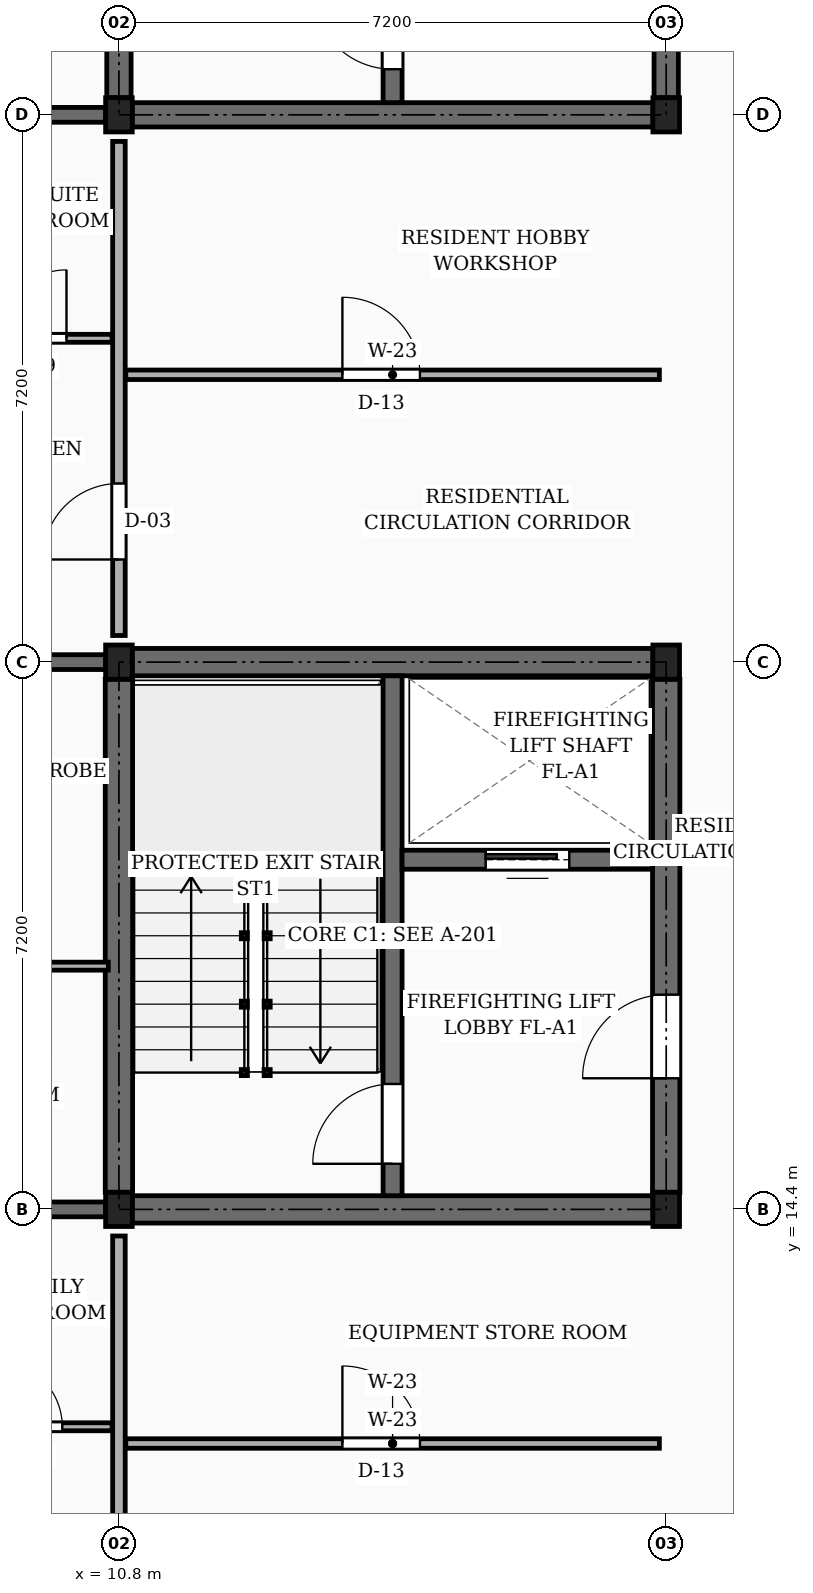
"""IFC4 building model, lengths in metres.
Left out: names, types, materials, properties, quantities, classifications, styles, units other than length and angle.
Written with IfcOpenShell. Run it as: python <this file> out.ifc"""

import sys

from ifc_helpers import new_model, si_unit, direction, frame, frame_2d, origin, origin_2d, place, context, subcontext, project, spatial, rectangle, extrude, element, fill, save


model = new_model("IFC4")
c1 = context("Model", 3, precision=1e-05, world=origin(), true_north=direction((0.0, 1.0)))
c2 = subcontext(c1, "Body", "Model", "MODEL_VIEW")
j1 = project(units=[si_unit("LENGTHUNIT", "METRE"), si_unit("PLANEANGLEUNIT", "RADIAN")], contexts=[c1])
p1 = place(None, origin())
s1 = spatial("IfcSite", under=j1, at=p1, CompositionType="ELEMENT")
p2 = place(p1, origin())
s2 = spatial("IfcBuilding", under=s1, at=p2, CompositionType="ELEMENT")
p3 = place(p2, frame((0.0, 0.0, 45.45)))
s3 = spatial("IfcBuildingStorey", under=s2, at=p3, CompositionType="ELEMENT", Elevation=45.45)
for number, where, z_axis, x_axis in (
    (1, (10.8, 14.4, 0.0), (0.0, 0.0, 1.0), (1.0, 0.0, 0.0)),
    (2, (10.8, 21.6, 0.0), (0.0, 0.0, 1.0), (1.0, 0.0, 0.0)),
    (3, (10.8, 28.8, 0.0), (0.0, 0.0, 1.0), (1.0, 0.0, 0.0)),
    (4, (18.0, 14.4, 0.0), (0.0, 0.0, 1.0), (1.0, 0.0, 0.0)),
    (5, (18.0, 21.6, 0.0), (0.0, 0.0, 1.0), (1.0, 0.0, 0.0)),
    (6, (18.0, 28.8, 0.0), (0.0, 0.0, 1.0), (1.0, 0.0, 0.0)),
):
    element("IfcColumn", number, at=place(p3, frame(where, z_axis=z_axis, x_axis=x_axis)), inside=s3, PredefinedType="COLUMN", context=c2, shape_type="SweptSolid", body=[
        extrude(rectangle(XDim=0.35, YDim=0.45, at=origin_2d()), origin(), (0.0, 0.0, 1.0), 3.15),
    ])
p4 = place(p3, frame((3.775, 14.4, 0.0), z_axis=(0.0, 0.0, 1.0), x_axis=(1.0, 0.0, 0.0)))
e7 = element("IfcWall", 7, at=p4, inside=s3, PredefinedType="SOLIDWALL", context=c2, shape_type="SweptSolid", body=[
    extrude(rectangle(XDim=6.85, YDim=0.195, at=frame_2d((3.425, 0.0))), origin(), (0.0, 0.0, 1.0), 2.17),
])
p5 = place(p4, frame((1.35, 0.0, 0.0)))
e8 = element("IfcOpeningElement", 8, at=p5, cuts=e7, PredefinedType="OPENING", context=c2, shape_type="SweptSolid", body=[
    extrude(rectangle(XDim=0.98, YDim=2.12, at=frame_2d((0.49, 1.06))), frame((0.0, 0.107, 0.0), z_axis=(0.0, -1.0, 0.0), x_axis=(1.0, 0.0, 0.0)), (0.0, 0.0, 1.0), 0.215),
])
p6 = place(p3, frame((3.775, 21.6, 0.0), z_axis=(0.0, 0.0, 1.0), x_axis=(1.0, 0.0, 0.0)))
e9 = element("IfcWall", 9, at=p6, inside=s3, PredefinedType="SOLIDWALL", context=c2, shape_type="SweptSolid", body=[
    extrude(rectangle(XDim=6.85, YDim=0.195, at=frame_2d((3.425, 0.0))), origin(), (0.0, 0.0, 1.0), 2.17),
])
p7 = place(p3, frame((3.775, 28.8, 0.0), z_axis=(0.0, 0.0, 1.0), x_axis=(1.0, 0.0, 0.0)))
e10 = element("IfcWall", 10, at=p7, inside=s3, PredefinedType="SOLIDWALL", context=c2, shape_type="SweptSolid", body=[
    extrude(rectangle(XDim=6.85, YDim=0.195, at=frame_2d((3.425, 0.0))), origin(), (0.0, 0.0, 1.0), 2.17),
])
p8 = place(p7, frame((1.35, 0.0, 0.0)))
e11 = element("IfcOpeningElement", 11, at=p8, cuts=e10, PredefinedType="OPENING", context=c2, shape_type="SweptSolid", body=[
    extrude(rectangle(XDim=0.98, YDim=2.12, at=frame_2d((0.49, 1.06))), frame((0.0, 0.107, 0.0), z_axis=(0.0, -1.0, 0.0), x_axis=(1.0, 0.0, 0.0)), (0.0, 0.0, 1.0), 0.215),
])
p9 = place(p3, frame((10.8, 14.625, 0.0), z_axis=(0.0, 0.0, 1.0), x_axis=(0.0, 1.0, 0.0)))
e12 = element("IfcWall", 12, at=p9, inside=s3, PredefinedType="SHEAR", context=c2, shape_type="SweptSolid", body=[
    extrude(rectangle(XDim=6.75, YDim=0.36, at=frame_2d((3.375, 0.0))), origin(), (0.0, 0.0, 1.0), 2.87),
])
p10 = place(p3, frame((10.975, 21.6, 0.0), z_axis=(0.0, 0.0, 1.0), x_axis=(1.0, 0.0, 0.0)))
e13 = element("IfcWall", 13, at=p10, inside=s3, PredefinedType="SHEAR", context=c2, shape_type="SweptSolid", body=[
    extrude(rectangle(XDim=6.85, YDim=0.36, at=frame_2d((3.425, 0.0))), origin(), (0.0, 0.0, 1.0), 2.87),
])
p11 = place(p3, frame((18.0, 14.625, 0.0), z_axis=(0.0, 0.0, 1.0), x_axis=(0.0, 1.0, 0.0)))
e14 = element("IfcWall", 14, at=p11, inside=s3, PredefinedType="SHEAR", context=c2, shape_type="SweptSolid", body=[
    extrude(rectangle(XDim=6.75, YDim=0.36, at=frame_2d((3.375, 0.0))), origin(), (0.0, 0.0, 1.0), 2.87),
])
p12 = place(p11, frame((1.5, 0.0, 0.0)))
e15 = element("IfcOpeningElement", 15, at=p12, cuts=e14, PredefinedType="OPENING", context=c2, shape_type="SweptSolid", body=[
    extrude(rectangle(XDim=1.1, YDim=2.15, at=frame_2d((0.55, 1.075))), frame((0.0, 0.19, 0.0), z_axis=(0.0, -1.0, 0.0), x_axis=(1.0, 0.0, 0.0)), (0.0, 0.0, 1.0), 0.38),
])
p13 = place(p3, frame((10.975, 14.4, 0.0), z_axis=(0.0, 0.0, 1.0), x_axis=(1.0, 0.0, 0.0)))
e16 = element("IfcWall", 16, at=p13, inside=s3, PredefinedType="SHEAR", context=c2, shape_type="SweptSolid", body=[
    extrude(rectangle(XDim=6.85, YDim=0.36, at=frame_2d((3.425, 0.0))), origin(), (0.0, 0.0, 1.0), 2.87),
])
p14 = place(p3, frame((14.4, 14.58, 0.0), z_axis=(0.0, 0.0, 1.0), x_axis=(0.0, 1.0, 0.0)))
e17 = element("IfcWall", 17, at=p14, inside=s3, PredefinedType="SHEAR", context=c2, shape_type="SweptSolid", body=[
    extrude(rectangle(XDim=6.84, YDim=0.25, at=frame_2d((3.42, 0.0))), origin(), (0.0, 0.0, 1.0), 2.87),
])
p15 = place(p14, frame((0.42, 0.0, 0.0)))
e18 = element("IfcOpeningElement", 18, at=p15, cuts=e17, PredefinedType="OPENING", context=c2, shape_type="SweptSolid", body=[
    extrude(rectangle(XDim=1.05, YDim=2.15, at=frame_2d((0.525, 1.075))), frame((0.0, 0.135, 0.0), z_axis=(0.0, -1.0, 0.0), x_axis=(1.0, 0.0, 0.0)), (0.0, 0.0, 1.0), 0.27),
])
p16 = place(p3, frame((14.525, 19.0, 0.0), z_axis=(0.0, 0.0, 1.0), x_axis=(1.0, 0.0, 0.0)))
e19 = element("IfcWall", 19, at=p16, inside=s3, PredefinedType="SHEAR", context=c2, shape_type="SweptSolid", body=[
    extrude(rectangle(XDim=3.295, YDim=0.25, at=frame_2d((1.647, 0.0))), origin(), (0.0, 0.0, 1.0), 2.87),
])
p17 = place(p16, frame((1.1, 0.0, 0.0)))
e20 = element("IfcOpeningElement", 20, at=p17, cuts=e19, PredefinedType="OPENING", context=c2, shape_type="SweptSolid", body=[
    extrude(rectangle(XDim=1.1, YDim=2.2, at=frame_2d((0.55, 1.1))), frame((0.0, 0.135, 0.0), z_axis=(0.0, -1.0, 0.0), x_axis=(1.0, 0.0, 0.0)), (0.0, 0.0, 1.0), 0.27),
])
p18 = place(p3, frame((10.8, 29.025, 0.0), z_axis=(0.0, 0.0, 1.0), x_axis=(0.0, 1.0, 0.0)))
e21 = element("IfcWall", 21, at=p18, inside=s3, PredefinedType="SHEAR", context=c2, shape_type="SweptSolid", body=[
    extrude(rectangle(XDim=6.75, YDim=0.32, at=frame_2d((3.375, 0.0))), origin(), (0.0, 0.0, 1.0), 2.87),
])
p19 = place(p3, frame((18.0, 29.025, 0.0), z_axis=(0.0, 0.0, 1.0), x_axis=(0.0, 1.0, 0.0)))
e22 = element("IfcWall", 22, at=p19, inside=s3, PredefinedType="SHEAR", context=c2, shape_type="SweptSolid", body=[
    extrude(rectangle(XDim=6.75, YDim=0.32, at=frame_2d((3.375, 0.0))), origin(), (0.0, 0.0, 1.0), 2.87),
])
p20 = place(p19, frame((1.5, 0.0, 0.0)))
e23 = element("IfcOpeningElement", 23, at=p20, cuts=e22, PredefinedType="OPENING", context=c2, shape_type="SweptSolid", body=[
    extrude(rectangle(XDim=1.1, YDim=2.15, at=frame_2d((0.55, 1.075))), frame((0.0, 0.17, 0.0), z_axis=(0.0, -1.0, 0.0), x_axis=(1.0, 0.0, 0.0)), (0.0, 0.0, 1.0), 0.34),
])
p21 = place(p3, frame((10.975, 28.8, 0.0), z_axis=(0.0, 0.0, 1.0), x_axis=(1.0, 0.0, 0.0)))
e24 = element("IfcWall", 24, at=p21, inside=s3, PredefinedType="SHEAR", context=c2, shape_type="SweptSolid", body=[
    extrude(rectangle(XDim=6.85, YDim=0.32, at=frame_2d((3.425, 0.0))), origin(), (0.0, 0.0, 1.0), 2.87),
])
p22 = place(p3, frame((14.4, 28.96, 0.0), z_axis=(0.0, 0.0, 1.0), x_axis=(0.0, 1.0, 0.0)))
e25 = element("IfcWall", 25, at=p22, inside=s3, PredefinedType="SHEAR", context=c2, shape_type="SweptSolid", body=[
    extrude(rectangle(XDim=6.88, YDim=0.25, at=frame_2d((3.44, 0.0))), origin(), (0.0, 0.0, 1.0), 2.87),
])
p23 = place(p22, frame((0.44, 0.0, 0.0)))
e26 = element("IfcOpeningElement", 26, at=p23, cuts=e25, PredefinedType="OPENING", context=c2, shape_type="SweptSolid", body=[
    extrude(rectangle(XDim=1.05, YDim=2.15, at=frame_2d((0.525, 1.075))), frame((0.0, 0.135, 0.0), z_axis=(0.0, -1.0, 0.0), x_axis=(1.0, 0.0, 0.0)), (0.0, 0.0, 1.0), 0.27),
])
p24 = place(p3, frame((10.8, 7.55, 0.0), z_axis=(0.0, 0.0, 1.0), x_axis=(0.0, 1.0, 0.0)))
e27 = element("IfcWall", 27, at=p24, inside=s3, PredefinedType="PARTITIONING", context=c2, shape_type="SweptSolid", body=[
    extrude(rectangle(XDim=6.5, YDim=0.165, at=frame_2d((3.25, 0.0))), origin(), (0.0, 0.0, 1.0), 2.305),
])
p25 = place(p24, frame((1.0, 0.0, 0.0)))
e28 = element("IfcOpeningElement", 28, at=p25, cuts=e27, PredefinedType="OPENING", context=c2, shape_type="SweptSolid", body=[
    extrude(rectangle(XDim=1.14, YDim=2.18, at=frame_2d((0.57, 1.09))), frame((0.0, 0.093, 0.0), z_axis=(0.0, -1.0, 0.0), x_axis=(1.0, 0.0, 0.0)), (0.0, 0.0, 1.0), 0.185),
])
p26 = place(p3, frame((10.8, 21.95, 0.0), z_axis=(0.0, 0.0, 1.0), x_axis=(0.0, 1.0, 0.0)))
e29 = element("IfcWall", 29, at=p26, inside=s3, PredefinedType="PARTITIONING", context=c2, shape_type="SweptSolid", body=[
    extrude(rectangle(XDim=6.5, YDim=0.165, at=frame_2d((3.25, 0.0))), origin(), (0.0, 0.0, 1.0), 2.305),
])
p27 = place(p26, frame((1.0, 0.0, 0.0)))
e30 = element("IfcOpeningElement", 30, at=p27, cuts=e29, PredefinedType="OPENING", context=c2, shape_type="SweptSolid", body=[
    extrude(rectangle(XDim=1.0, YDim=2.15, at=frame_2d((0.5, 1.075))), frame((0.0, 0.093, 0.0), z_axis=(0.0, -1.0, 0.0), x_axis=(1.0, 0.0, 0.0)), (0.0, 0.0, 1.0), 0.185),
])
p28 = place(p3, frame((10.89, 11.32, 0.0), z_axis=(0.0, 0.0, 1.0), x_axis=(1.0, 0.0, 0.0)))
e31 = element("IfcWall", 31, at=p28, inside=s3, PredefinedType="PARTITIONING", context=c2, shape_type="SweptSolid", body=[
    extrude(rectangle(XDim=7.02, YDim=0.125, at=frame_2d((3.51, 0.0))), origin(), (0.0, 0.0, 1.0), 2.305),
])
p29 = place(p28, frame((2.85, 0.0, 0.0)))
e32 = element("IfcOpeningElement", 32, at=p29, cuts=e31, PredefinedType="OPENING", context=c2, shape_type="SweptSolid", body=[
    extrude(rectangle(XDim=1.02, YDim=2.15, at=frame_2d((0.51, 1.075))), frame((0.0, 0.073, 0.0), z_axis=(0.0, -1.0, 0.0), x_axis=(1.0, 0.0, 0.0)), (0.0, 0.0, 1.0), 0.145),
])
p30 = place(p3, frame((8.53, 11.54, 0.0), z_axis=(0.0, 0.0, 1.0), x_axis=(1.0, 0.0, 0.0)))
e33 = element("IfcWall", 33, at=p30, inside=s3, PredefinedType="PARTITIONING", context=c2, shape_type="SweptSolid", body=[
    extrude(rectangle(XDim=2.18, YDim=0.105, at=frame_2d((1.09, 0.0))), origin(), (0.0, 0.0, 1.0), 2.305),
])
p31 = place(p30, frame((0.655, 0.0, 0.0)))
e34 = element("IfcOpeningElement", 34, at=p31, cuts=e33, PredefinedType="OPENING", context=c2, shape_type="SweptSolid", body=[
    extrude(rectangle(XDim=0.87, YDim=2.05, at=frame_2d((0.435, 1.025))), frame((0.0, 0.062, 0.0), z_axis=(0.0, -1.0, 0.0), x_axis=(1.0, 0.0, 0.0)), (0.0, 0.0, 1.0), 0.125),
])
p32 = place(p3, frame((7.27, 17.6, 0.0), z_axis=(0.0, 0.0, 1.0), x_axis=(1.0, 0.0, 0.0)))
e35 = element("IfcWall", 35, at=p32, inside=s3, PredefinedType="PARTITIONING", context=c2, shape_type="SweptSolid", body=[
    extrude(rectangle(XDim=3.39, YDim=0.105, at=frame_2d((1.695, 0.0))), origin(), (0.0, 0.0, 1.0), 2.305),
])
p33 = place(p3, frame((10.89, 25.38, 0.0), z_axis=(0.0, 0.0, 1.0), x_axis=(1.0, 0.0, 0.0)))
e36 = element("IfcWall", 36, at=p33, inside=s3, PredefinedType="PARTITIONING", context=c2, shape_type="SweptSolid", body=[
    extrude(rectangle(XDim=7.02, YDim=0.125, at=frame_2d((3.51, 0.0))), origin(), (0.0, 0.0, 1.0), 2.305),
])
p34 = place(p33, frame((2.85, 0.0, 0.0)))
e37 = element("IfcOpeningElement", 37, at=p34, cuts=e36, PredefinedType="OPENING", context=c2, shape_type="SweptSolid", body=[
    extrude(rectangle(XDim=1.02, YDim=2.15, at=frame_2d((0.51, 1.075))), frame((0.0, 0.073, 0.0), z_axis=(0.0, -1.0, 0.0), x_axis=(1.0, 0.0, 0.0)), (0.0, 0.0, 1.0), 0.145),
])
p35 = place(p3, frame((8.61, 25.86, 0.0), z_axis=(0.0, 0.0, 1.0), x_axis=(1.0, 0.0, 0.0)))
e38 = element("IfcWall", 38, at=p35, inside=s3, PredefinedType="PARTITIONING", context=c2, shape_type="SweptSolid", body=[
    extrude(rectangle(XDim=2.1, YDim=0.105, at=frame_2d((1.05, 0.0))), origin(), (0.0, 0.0, 1.0), 2.305),
])
p36 = place(p35, frame((0.6, 0.0, 0.0)))
e39 = element("IfcOpeningElement", 39, at=p36, cuts=e38, PredefinedType="OPENING", context=c2, shape_type="SweptSolid", body=[
    extrude(rectangle(XDim=0.9, YDim=2.05, at=frame_2d((0.45, 1.025))), frame((0.0, 0.062, 0.0), z_axis=(0.0, -1.0, 0.0), x_axis=(1.0, 0.0, 0.0)), (0.0, 0.0, 1.0), 0.125),
])
p37 = place(p12, frame((1.1, 0.0, 0.0), z_axis=(0.0, 0.0, 1.0), x_axis=(-1.0, 0.0, 0.0)))
e40 = element("IfcDoor", 40, at=p37, inside=s3, OperationType="SINGLE_SWING_LEFT", PredefinedType="DOOR", context=c2, shape_type="SweptSolid", body=[
    extrude(rectangle(XDim=1.1, YDim=2.15, at=frame_2d((0.55, 1.075))), frame((0.0, 0.025, 0.0), z_axis=(0.0, -1.0, 0.0), x_axis=(1.0, 0.0, 0.0)), (0.0, 0.0, 1.0), 0.05),
])
fill(e15, e40)
p38 = place(p15, origin())
e41 = element("IfcDoor", 41, at=p38, inside=s3, OperationType="SINGLE_SWING_LEFT", PredefinedType="DOOR", context=c2, shape_type="SweptSolid", body=[
    extrude(rectangle(XDim=1.05, YDim=2.15, at=frame_2d((0.525, 1.075))), frame((0.0, 0.025, 0.0), z_axis=(0.0, -1.0, 0.0), x_axis=(1.0, 0.0, 0.0)), (0.0, 0.0, 1.0), 0.05),
])
fill(e18, e41)
p39 = place(p17, origin())
e42 = element("IfcDoor", 42, at=p39, inside=s3, OperationType="SLIDING_TO_LEFT", PredefinedType="DOOR", context=c2, shape_type="SweptSolid", body=[
    extrude(rectangle(XDim=1.1, YDim=2.2, at=frame_2d((0.55, 1.1))), frame((0.0, 0.025, 0.0), z_axis=(0.0, -1.0, 0.0), x_axis=(1.0, 0.0, 0.0)), (0.0, 0.0, 1.0), 0.05),
])
fill(e20, e42)
p40 = place(p23, origin())
e43 = element("IfcDoor", 43, at=p40, inside=s3, OperationType="SINGLE_SWING_RIGHT", PredefinedType="DOOR", context=c2, shape_type="SweptSolid", body=[
    extrude(rectangle(XDim=1.05, YDim=2.15, at=frame_2d((0.525, 1.075))), frame((0.0, 0.025, 0.0), z_axis=(0.0, -1.0, 0.0), x_axis=(1.0, 0.0, 0.0)), (0.0, 0.0, 1.0), 0.05),
])
fill(e26, e43)
p41 = place(p27, origin())
e44 = element("IfcDoor", 44, at=p41, inside=s3, OperationType="SINGLE_SWING_LEFT", PredefinedType="DOOR", context=c2, shape_type="SweptSolid", body=[
    extrude(rectangle(XDim=1.0, YDim=2.15, at=frame_2d((0.5, 1.075))), frame((0.0, 0.025, 0.0), z_axis=(0.0, -1.0, 0.0), x_axis=(1.0, 0.0, 0.0)), (0.0, 0.0, 1.0), 0.05),
])
fill(e30, e44)
p42 = place(p29, origin())
e45 = element("IfcDoor", 45, at=p42, inside=s3, OperationType="SINGLE_SWING_LEFT", PredefinedType="DOOR", context=c2, shape_type="SweptSolid", body=[
    extrude(rectangle(XDim=1.02, YDim=2.15, at=frame_2d((0.51, 1.075))), frame((0.0, 0.025, 0.0), z_axis=(0.0, -1.0, 0.0), x_axis=(1.0, 0.0, 0.0)), (0.0, 0.0, 1.0), 0.05),
])
fill(e32, e45)
p43 = place(p31, origin())
e46 = element("IfcDoor", 46, at=p43, inside=s3, OperationType="SINGLE_SWING_LEFT", PredefinedType="DOOR", context=c2, shape_type="SweptSolid", body=[
    extrude(rectangle(XDim=0.87, YDim=2.05, at=frame_2d((0.435, 1.025))), frame((0.0, 0.025, 0.0), z_axis=(0.0, -1.0, 0.0), x_axis=(1.0, 0.0, 0.0)), (0.0, 0.0, 1.0), 0.05),
])
fill(e34, e46)
p44 = place(p34, origin())
e47 = element("IfcDoor", 47, at=p44, inside=s3, OperationType="SINGLE_SWING_LEFT", PredefinedType="DOOR", context=c2, shape_type="SweptSolid", body=[
    extrude(rectangle(XDim=1.02, YDim=2.15, at=frame_2d((0.51, 1.075))), frame((0.0, 0.025, 0.0), z_axis=(0.0, -1.0, 0.0), x_axis=(1.0, 0.0, 0.0)), (0.0, 0.0, 1.0), 0.05),
])
fill(e37, e47)
p45 = place(p36, origin())
e48 = element("IfcDoor", 48, at=p45, inside=s3, OperationType="SINGLE_SWING_RIGHT", PredefinedType="DOOR", context=c2, shape_type="SweptSolid", body=[
    extrude(rectangle(XDim=0.9, YDim=2.05, at=frame_2d((0.45, 1.025))), frame((0.0, 0.025, 0.0), z_axis=(0.0, -1.0, 0.0), x_axis=(1.0, 0.0, 0.0)), (0.0, 0.0, 1.0), 0.05),
])
fill(e39, e48)
save(model, sys.argv[1])
